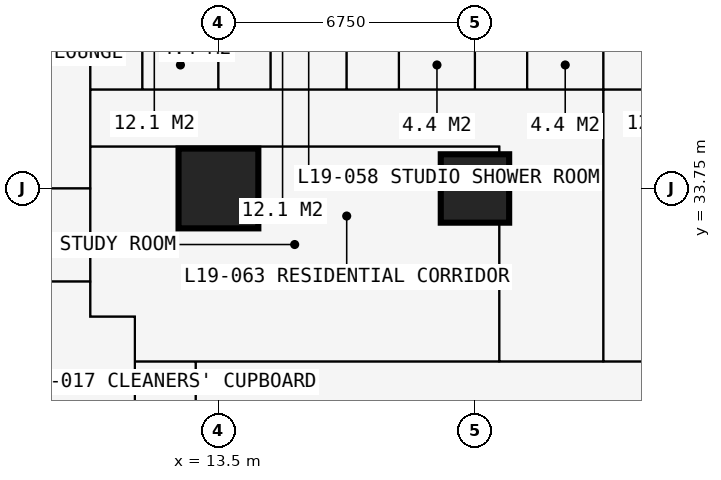
"""IFC4 building model, lengths in metres.
Left out: names, types, materials, properties, quantities, classifications, styles, units other than length and angle.
Written with IfcOpenShell. Run it as: python <this file> out.ifc"""

import sys

from ifc_helpers import new_model, si_unit, direction, frame, frame_2d, origin, origin_2d, place, context, subcontext, project, spatial, rectangle, extrude, element, fill, save


model = new_model("IFC4")
c1 = context("Model", 3, precision=1e-05, world=origin(), true_north=direction((0.0, 1.0)))
c2 = subcontext(c1, "Body", "Model", "MODEL_VIEW")
j1 = project(units=[si_unit("LENGTHUNIT", "METRE"), si_unit("PLANEANGLEUNIT", "RADIAN")], contexts=[c1])
p1 = place(None, origin())
s1 = spatial("IfcSite", under=j1, at=p1, CompositionType="ELEMENT")
p2 = place(p1, origin())
s2 = spatial("IfcBuilding", under=s1, at=p2, CompositionType="ELEMENT")
p3 = place(p2, frame((0.0, 0.0, 72.0)))
s3 = spatial("IfcBuildingStorey", under=s2, at=p3, CompositionType="ELEMENT", Elevation=72.0)
p4 = place(p3, frame((13.5, 33.75, 0.0), z_axis=(0.0, 0.0, 1.0), x_axis=(1.0, 0.0, 0.0)))
e1 = element("IfcColumn", 1, at=p4, inside=s3, PredefinedType="COLUMN", context=c2, shape_type="SweptSolid", body=[
    extrude(rectangle(XDim=2.1, YDim=2.1, at=origin_2d()), origin(), (0.0, 0.0, 1.0), 3.6),
])
p5 = place(p3, frame((20.25, 33.75, 0.0), z_axis=(0.0, 0.0, 1.0), x_axis=(1.0, 0.0, 0.0)))
e2 = element("IfcColumn", 2, at=p5, inside=s3, PredefinedType="COLUMN", context=c2, shape_type="SweptSolid", body=[
    extrude(rectangle(XDim=1.8, YDim=1.8, at=origin_2d()), origin(), (0.0, 0.0, 1.0), 3.6),
])
p6 = place(p3, frame((-0.734, 33.75, 0.0), z_axis=(0.0, 0.0, 1.0), x_axis=(1.0, 0.0, 0.0)))
e3 = element("IfcWall", 3, at=p6, inside=s3, PredefinedType="PARTITIONING", context=c2, shape_type="SweptSolid", body=[
    extrude(rectangle(XDim=10.859, YDim=0.15, at=frame_2d((5.429, 0.0))), origin(), (0.0, 0.0, 1.0), 2.802),
])
p7 = place(p3, frame((5.65, 31.3, 0.0), z_axis=(0.0, 0.0, 1.0), x_axis=(1.0, 0.0, 0.0)))
e4 = element("IfcWall", 4, at=p7, inside=s3, PredefinedType="PARTITIONING", context=c2, shape_type="SweptSolid", body=[
    extrude(rectangle(XDim=4.475, YDim=0.15, at=frame_2d((2.238, 0.0))), origin(), (0.0, 0.0, 1.0), 3.3),
])
p8 = place(p3, frame((10.125, 30.375, 0.0), z_axis=(0.0, 0.0, 1.0), x_axis=(0.0, 1.0, 0.0)))
e5 = element("IfcWall", 5, at=p8, inside=s3, PredefinedType="PARTITIONING", context=c2, shape_type="SweptSolid", body=[
    extrude(rectangle(XDim=10.859, YDim=0.15, at=frame_2d((5.429, 0.0))), origin(), (0.0, 0.0, 1.0), 3.3),
])
p9 = place(p8, frame((4.725, 0.0, 0.0)))
e6 = element("IfcOpeningElement", 6, at=p9, cuts=e5, PredefinedType="OPENING", context=c2, shape_type="SweptSolid", body=[
    extrude(rectangle(XDim=1.0, YDim=2.2, at=frame_2d((0.5, 1.1))), frame((0.0, 0.085, 0.0), z_axis=(0.0, -1.0, 0.0), x_axis=(1.0, 0.0, 0.0)), (0.0, 0.0, 1.0), 0.17),
])
p10 = place(p3, frame((10.125, 30.375, 0.0), z_axis=(0.0, 0.0, 1.0), x_axis=(1.0, 0.0, 0.0)))
e7 = element("IfcWall", 7, at=p10, inside=s3, PredefinedType="PARTITIONING", context=c2, shape_type="SweptSolid", body=[
    extrude(rectangle(XDim=1.175, YDim=0.15, at=frame_2d((0.587, 0.0))), origin(), (0.0, 0.0, 1.0), 3.3),
])
p11 = place(p3, frame((10.125, 34.85, 0.0), z_axis=(0.0, 0.0, 1.0), x_axis=(1.0, 0.0, 0.0)))
e8 = element("IfcWall", 8, at=p11, inside=s3, PredefinedType="PARTITIONING", context=c2, shape_type="SweptSolid", body=[
    extrude(rectangle(XDim=10.762, YDim=0.15, at=frame_2d((5.381, 0.0))), origin(), (0.0, 0.0, 1.0), 3.3),
])
p12 = place(p11, frame((4.9, 0.0, 0.0)))
e9 = element("IfcOpeningElement", 9, at=p12, cuts=e8, PredefinedType="OPENING", context=c2, shape_type="SweptSolid", body=[
    extrude(rectangle(XDim=0.95, YDim=2.2, at=frame_2d((0.475, 1.1))), frame((0.0, 0.085, 0.0), z_axis=(0.0, -1.0, 0.0), x_axis=(1.0, 0.0, 0.0)), (0.0, 0.0, 1.0), 0.17),
])
p13 = place(p3, frame((10.125, 36.35, 0.0), z_axis=(0.0, 0.0, 1.0), x_axis=(1.0, 0.0, 0.0)))
e10 = element("IfcWall", 10, at=p13, inside=s3, PredefinedType="PARTITIONING", context=c2, shape_type="SweptSolid", body=[
    extrude(rectangle(XDim=23.625, YDim=0.1, at=frame_2d((11.812, 0.0))), origin(), (0.0, 0.0, 1.0), 3.3),
])
p14 = place(p13, frame((21.45, 0.0, 0.0)))
e11 = element("IfcOpeningElement", 11, at=p14, cuts=e10, PredefinedType="OPENING", context=c2, shape_type="SweptSolid", body=[
    extrude(rectangle(XDim=1.0, YDim=2.2, at=frame_2d((0.5, 1.1))), frame((0.0, 0.06, 0.0), z_axis=(0.0, -1.0, 0.0), x_axis=(1.0, 0.0, 0.0)), (0.0, 0.0, 1.0), 0.12),
])
p15 = place(p13, frame((17.125, 0.0, 0.0)))
e12 = element("IfcOpeningElement", 12, at=p15, cuts=e10, PredefinedType="OPENING", context=c2, shape_type="SweptSolid", body=[
    extrude(rectangle(XDim=0.95, YDim=2.2, at=frame_2d((0.475, 1.1))), frame((0.0, 0.06, 0.0), z_axis=(0.0, -1.0, 0.0), x_axis=(1.0, 0.0, 0.0)), (0.0, 0.0, 1.0), 0.12),
])
p16 = place(p13, frame((13.7, 0.0, 0.0)))
e13 = element("IfcOpeningElement", 13, at=p16, cuts=e10, PredefinedType="OPENING", context=c2, shape_type="SweptSolid", body=[
    extrude(rectangle(XDim=0.95, YDim=2.2, at=frame_2d((0.475, 1.1))), frame((0.0, 0.06, 0.0), z_axis=(0.0, -1.0, 0.0), x_axis=(1.0, 0.0, 0.0)), (0.0, 0.0, 1.0), 0.12),
])
p17 = place(p13, frame((0.2, 0.0, 0.0)))
e14 = element("IfcOpeningElement", 14, at=p17, cuts=e10, PredefinedType="OPENING", context=c2, shape_type="SweptSolid", body=[
    extrude(rectangle(XDim=0.95, YDim=2.2, at=frame_2d((0.475, 1.1))), frame((0.0, 0.06, 0.0), z_axis=(0.0, -1.0, 0.0), x_axis=(1.0, 0.0, 0.0)), (0.0, 0.0, 1.0), 0.12),
])
p18 = place(p13, frame((3.625, 0.0, 0.0)))
e15 = element("IfcOpeningElement", 15, at=p18, cuts=e10, PredefinedType="OPENING", context=c2, shape_type="SweptSolid", body=[
    extrude(rectangle(XDim=0.95, YDim=2.2, at=frame_2d((0.475, 1.1))), frame((0.0, 0.06, 0.0), z_axis=(0.0, -1.0, 0.0), x_axis=(1.0, 0.0, 0.0)), (0.0, 0.0, 1.0), 0.12),
])
p19 = place(p13, frame((7.0, 0.0, 0.0)))
e16 = element("IfcOpeningElement", 16, at=p19, cuts=e10, PredefinedType="OPENING", context=c2, shape_type="SweptSolid", body=[
    extrude(rectangle(XDim=0.95, YDim=2.2, at=frame_2d((0.475, 1.1))), frame((0.0, 0.06, 0.0), z_axis=(0.0, -1.0, 0.0), x_axis=(1.0, 0.0, 0.0)), (0.0, 0.0, 1.0), 0.12),
])
p20 = place(p13, frame((10.375, 0.0, 0.0)))
e17 = element("IfcOpeningElement", 17, at=p20, cuts=e10, PredefinedType="OPENING", context=c2, shape_type="SweptSolid", body=[
    extrude(rectangle(XDim=0.95, YDim=2.2, at=frame_2d((0.475, 1.1))), frame((0.0, 0.06, 0.0), z_axis=(0.0, -1.0, 0.0), x_axis=(1.0, 0.0, 0.0)), (0.0, 0.0, 1.0), 0.12),
])
p21 = place(p3, frame((11.3, 11.3, 0.0), z_axis=(0.0, 0.0, 1.0), x_axis=(0.0, 1.0, 0.0)))
e18 = element("IfcWall", 18, at=p21, inside=s3, PredefinedType="PARTITIONING", context=c2, shape_type="SweptSolid", body=[
    extrude(rectangle(XDim=19.075, YDim=0.15, at=frame_2d((9.538, 0.0))), origin(), (0.0, 0.0, 1.0), 3.3),
])
p22 = place(p21, frame((10.137, 0.0, 0.0)))
e19 = element("IfcOpeningElement", 19, at=p22, cuts=e18, PredefinedType="OPENING", context=c2, shape_type="SweptSolid", body=[
    extrude(rectangle(XDim=1.0, YDim=2.2, at=frame_2d((0.5, 1.1))), frame((0.0, 0.085, 0.0), z_axis=(0.0, -1.0, 0.0), x_axis=(1.0, 0.0, 0.0)), (0.0, 0.0, 1.0), 0.17),
])
p23 = place(p3, frame((11.3, 29.2, 0.0), z_axis=(0.0, 0.0, 1.0), x_axis=(1.0, 0.0, 0.0)))
e20 = element("IfcWall", 20, at=p23, inside=s3, PredefinedType="PARTITIONING", context=c2, shape_type="SweptSolid", body=[
    extrude(rectangle(XDim=19.075, YDim=0.15, at=frame_2d((9.538, 0.0))), origin(), (0.0, 0.0, 1.0), 3.3),
])
p24 = place(p23, frame((12.875, 0.0, 0.0)))
e21 = element("IfcOpeningElement", 21, at=p24, cuts=e20, PredefinedType="OPENING", context=c2, shape_type="SweptSolid", body=[
    extrude(rectangle(XDim=1.0, YDim=2.2, at=frame_2d((0.5, 1.1))), frame((0.0, 0.085, 0.0), z_axis=(0.0, -1.0, 0.0), x_axis=(1.0, 0.0, 0.0)), (0.0, 0.0, 1.0), 0.17),
])
p25 = place(p23, frame((10.438, 0.0, 0.0)))
e22 = element("IfcOpeningElement", 22, at=p25, cuts=e20, PredefinedType="OPENING", context=c2, shape_type="SweptSolid", body=[
    extrude(rectangle(XDim=1.0, YDim=2.2, at=frame_2d((0.5, 1.1))), frame((0.0, 0.085, 0.0), z_axis=(0.0, -1.0, 0.0), x_axis=(1.0, 0.0, 0.0)), (0.0, 0.0, 1.0), 0.17),
])
p26 = place(p23, frame((15.675, 0.0, 0.0)))
e23 = element("IfcOpeningElement", 23, at=p26, cuts=e20, PredefinedType="OPENING", context=c2, shape_type="SweptSolid", body=[
    extrude(rectangle(XDim=0.95, YDim=2.2, at=frame_2d((0.475, 1.1))), frame((0.0, 0.085, 0.0), z_axis=(0.0, -1.0, 0.0), x_axis=(1.0, 0.0, 0.0)), (0.0, 0.0, 1.0), 0.17),
])
p27 = place(p3, frame((11.5, 36.35, 0.0), z_axis=(0.0, 0.0, 1.0), x_axis=(0.0, 1.0, 0.0)))
e24 = element("IfcWall", 24, at=p27, inside=s3, PredefinedType="PARTITIONING", context=c2, shape_type="SweptSolid", body=[
    extrude(rectangle(XDim=2.2, YDim=0.1, at=frame_2d((1.1, 0.0))), origin(), (0.0, 0.0, 1.0), 3.3),
])
p28 = place(p27, frame((0.65, 0.0, 0.0)))
e25 = element("IfcOpeningElement", 25, at=p28, cuts=e24, PredefinedType="OPENING", context=c2, shape_type="SweptSolid", body=[
    extrude(rectangle(XDim=0.9, YDim=2.2, at=frame_2d((0.45, 1.1))), frame((0.0, 0.06, 0.0), z_axis=(0.0, -1.0, 0.0), x_axis=(1.0, 0.0, 0.0)), (0.0, 0.0, 1.0), 0.12),
])
p29 = place(p3, frame((12.9, 27.6, 0.0), z_axis=(0.0, 0.0, 1.0), x_axis=(0.0, 1.0, 0.0)))
e26 = element("IfcWall", 26, at=p29, inside=s3, PredefinedType="PARTITIONING", context=c2, shape_type="SweptSolid", body=[
    extrude(rectangle(XDim=1.6, YDim=0.15, at=frame_2d((0.8, 0.0))), origin(), (0.0, 0.0, 1.0), 3.3),
])
p30 = place(p3, frame((13.5, 36.35, 0.0), z_axis=(0.0, 0.0, 1.0), x_axis=(0.0, 1.0, 0.0)))
e27 = element("IfcWall", 27, at=p30, inside=s3, PredefinedType="PARTITIONING", context=c2, shape_type="SweptSolid", body=[
    extrude(rectangle(XDim=4.884, YDim=0.175, at=frame_2d((2.442, 0.0))), origin(), (0.0, 0.0, 1.0), 2.802),
])
p31 = place(p3, frame((14.875, 36.35, 0.0), z_axis=(0.0, 0.0, 1.0), x_axis=(0.0, 1.0, 0.0)))
e28 = element("IfcWall", 28, at=p31, inside=s3, PredefinedType="PARTITIONING", context=c2, shape_type="SweptSolid", body=[
    extrude(rectangle(XDim=2.2, YDim=0.1, at=frame_2d((1.1, 0.0))), origin(), (0.0, 0.0, 1.0), 3.3),
])
p32 = place(p31, frame((0.65, 0.0, 0.0)))
e29 = element("IfcOpeningElement", 29, at=p32, cuts=e28, PredefinedType="OPENING", context=c2, shape_type="SweptSolid", body=[
    extrude(rectangle(XDim=0.9, YDim=2.2, at=frame_2d((0.45, 1.1))), frame((0.0, 0.06, 0.0), z_axis=(0.0, -1.0, 0.0), x_axis=(1.0, 0.0, 0.0)), (0.0, 0.0, 1.0), 0.12),
])
p33 = place(p3, frame((16.875, 36.35, 0.0), z_axis=(0.0, 0.0, 1.0), x_axis=(0.0, 1.0, 0.0)))
e30 = element("IfcWall", 30, at=p33, inside=s3, PredefinedType="PARTITIONING", context=c2, shape_type="SweptSolid", body=[
    extrude(rectangle(XDim=4.884, YDim=0.175, at=frame_2d((2.442, 0.0))), origin(), (0.0, 0.0, 1.0), 3.3),
])
p34 = place(p3, frame((18.25, 36.35, 0.0), z_axis=(0.0, 0.0, 1.0), x_axis=(0.0, 1.0, 0.0)))
e31 = element("IfcWall", 31, at=p34, inside=s3, PredefinedType="PARTITIONING", context=c2, shape_type="SweptSolid", body=[
    extrude(rectangle(XDim=2.2, YDim=0.1, at=frame_2d((1.1, 0.0))), origin(), (0.0, 0.0, 1.0), 3.3),
])
p35 = place(p34, frame((0.65, 0.0, 0.0)))
e32 = element("IfcOpeningElement", 32, at=p35, cuts=e31, PredefinedType="OPENING", context=c2, shape_type="SweptSolid", body=[
    extrude(rectangle(XDim=0.9, YDim=2.2, at=frame_2d((0.45, 1.1))), frame((0.0, 0.06, 0.0), z_axis=(0.0, -1.0, 0.0), x_axis=(1.0, 0.0, 0.0)), (0.0, 0.0, 1.0), 0.12),
])
p36 = place(p3, frame((20.25, 36.35, 0.0), z_axis=(0.0, 0.0, 1.0), x_axis=(0.0, 1.0, 0.0)))
e33 = element("IfcWall", 33, at=p36, inside=s3, PredefinedType="PARTITIONING", context=c2, shape_type="SweptSolid", body=[
    extrude(rectangle(XDim=4.884, YDim=0.175, at=frame_2d((2.442, 0.0))), origin(), (0.0, 0.0, 1.0), 2.731),
])
p37 = place(p3, frame((20.887, 29.2, 0.0), z_axis=(0.0, 0.0, 1.0), x_axis=(0.0, 1.0, 0.0)))
e34 = element("IfcWall", 34, at=p37, inside=s3, PredefinedType="PARTITIONING", context=c2, shape_type="SweptSolid", body=[
    extrude(rectangle(XDim=5.65, YDim=0.15, at=frame_2d((2.825, 0.0))), origin(), (0.0, 0.0, 1.0), 3.3),
])
p38 = place(p3, frame((21.625, 36.35, 0.0), z_axis=(0.0, 0.0, 1.0), x_axis=(0.0, 1.0, 0.0)))
e35 = element("IfcWall", 35, at=p38, inside=s3, PredefinedType="PARTITIONING", context=c2, shape_type="SweptSolid", body=[
    extrude(rectangle(XDim=2.2, YDim=0.1, at=frame_2d((1.1, 0.0))), origin(), (0.0, 0.0, 1.0), 3.3),
])
p39 = place(p38, frame((0.65, 0.0, 0.0)))
e36 = element("IfcOpeningElement", 36, at=p39, cuts=e35, PredefinedType="OPENING", context=c2, shape_type="SweptSolid", body=[
    extrude(rectangle(XDim=0.9, YDim=2.2, at=frame_2d((0.45, 1.1))), frame((0.0, 0.06, 0.0), z_axis=(0.0, -1.0, 0.0), x_axis=(1.0, 0.0, 0.0)), (0.0, 0.0, 1.0), 0.12),
])
p40 = place(p3, frame((23.625, 29.2, 0.0), z_axis=(0.0, 0.0, 1.0), x_axis=(0.0, 1.0, 0.0)))
e37 = element("IfcWall", 37, at=p40, inside=s3, PredefinedType="PARTITIONING", context=c2, shape_type="SweptSolid", body=[
    extrude(rectangle(XDim=12.034, YDim=0.15, at=frame_2d((6.017, 0.0))), origin(), (0.0, 0.0, 1.0), 3.3),
])
p41 = place(p16, origin())
e38 = element("IfcDoor", 38, at=p41, inside=s3, OperationType="SINGLE_SWING_LEFT", PredefinedType="DOOR", context=c2, shape_type="SweptSolid", body=[
    extrude(rectangle(XDim=0.95, YDim=2.2, at=frame_2d((0.475, 1.1))), frame((0.0, 0.025, 0.0), z_axis=(0.0, -1.0, 0.0), x_axis=(1.0, 0.0, 0.0)), (0.0, 0.0, 1.0), 0.05),
])
fill(e13, e38)
p42 = place(p24, origin())
e39 = element("IfcDoor", 39, at=p42, inside=s3, OperationType="SINGLE_SWING_LEFT", PredefinedType="DOOR", context=c2, shape_type="SweptSolid", body=[
    extrude(rectangle(XDim=1.0, YDim=2.2, at=frame_2d((0.5, 1.1))), frame((0.0, 0.025, 0.0), z_axis=(0.0, -1.0, 0.0), x_axis=(1.0, 0.0, 0.0)), (0.0, 0.0, 1.0), 0.05),
])
fill(e21, e39)
p43 = place(p17, origin())
e40 = element("IfcDoor", 40, at=p43, inside=s3, OperationType="SINGLE_SWING_LEFT", PredefinedType="DOOR", context=c2, shape_type="SweptSolid", body=[
    extrude(rectangle(XDim=0.95, YDim=2.2, at=frame_2d((0.475, 1.1))), frame((0.0, 0.025, 0.0), z_axis=(0.0, -1.0, 0.0), x_axis=(1.0, 0.0, 0.0)), (0.0, 0.0, 1.0), 0.05),
])
fill(e14, e40)
p44 = place(p28, origin())
e41 = element("IfcDoor", 41, at=p44, inside=s3, OperationType="SINGLE_SWING_RIGHT", PredefinedType="DOOR", context=c2, shape_type="SweptSolid", body=[
    extrude(rectangle(XDim=0.9, YDim=2.2, at=frame_2d((0.45, 1.1))), frame((0.0, 0.025, 0.0), z_axis=(0.0, -1.0, 0.0), x_axis=(1.0, 0.0, 0.0)), (0.0, 0.0, 1.0), 0.05),
])
fill(e25, e41)
p45 = place(p18, origin())
e42 = element("IfcDoor", 42, at=p45, inside=s3, OperationType="SINGLE_SWING_LEFT", PredefinedType="DOOR", context=c2, shape_type="SweptSolid", body=[
    extrude(rectangle(XDim=0.95, YDim=2.2, at=frame_2d((0.475, 1.1))), frame((0.0, 0.025, 0.0), z_axis=(0.0, -1.0, 0.0), x_axis=(1.0, 0.0, 0.0)), (0.0, 0.0, 1.0), 0.05),
])
fill(e15, e42)
p46 = place(p32, origin())
e43 = element("IfcDoor", 43, at=p46, inside=s3, OperationType="SINGLE_SWING_RIGHT", PredefinedType="DOOR", context=c2, shape_type="SweptSolid", body=[
    extrude(rectangle(XDim=0.9, YDim=2.2, at=frame_2d((0.45, 1.1))), frame((0.0, 0.025, 0.0), z_axis=(0.0, -1.0, 0.0), x_axis=(1.0, 0.0, 0.0)), (0.0, 0.0, 1.0), 0.05),
])
fill(e29, e43)
p47 = place(p19, origin())
e44 = element("IfcDoor", 44, at=p47, inside=s3, OperationType="SINGLE_SWING_LEFT", PredefinedType="DOOR", context=c2, shape_type="SweptSolid", body=[
    extrude(rectangle(XDim=0.95, YDim=2.2, at=frame_2d((0.475, 1.1))), frame((0.0, 0.025, 0.0), z_axis=(0.0, -1.0, 0.0), x_axis=(1.0, 0.0, 0.0)), (0.0, 0.0, 1.0), 0.05),
])
fill(e16, e44)
p48 = place(p35, origin())
e45 = element("IfcDoor", 45, at=p48, inside=s3, OperationType="SINGLE_SWING_RIGHT", PredefinedType="DOOR", context=c2, shape_type="SweptSolid", body=[
    extrude(rectangle(XDim=0.9, YDim=2.2, at=frame_2d((0.45, 1.1))), frame((0.0, 0.025, 0.0), z_axis=(0.0, -1.0, 0.0), x_axis=(1.0, 0.0, 0.0)), (0.0, 0.0, 1.0), 0.05),
])
fill(e32, e45)
p49 = place(p20, origin())
e46 = element("IfcDoor", 46, at=p49, inside=s3, OperationType="SINGLE_SWING_LEFT", PredefinedType="DOOR", context=c2, shape_type="SweptSolid", body=[
    extrude(rectangle(XDim=0.95, YDim=2.2, at=frame_2d((0.475, 1.1))), frame((0.0, 0.025, 0.0), z_axis=(0.0, -1.0, 0.0), x_axis=(1.0, 0.0, 0.0)), (0.0, 0.0, 1.0), 0.05),
])
fill(e17, e46)
p50 = place(p39, origin())
e47 = element("IfcDoor", 47, at=p50, inside=s3, OperationType="SINGLE_SWING_RIGHT", PredefinedType="DOOR", context=c2, shape_type="SweptSolid", body=[
    extrude(rectangle(XDim=0.9, YDim=2.2, at=frame_2d((0.45, 1.1))), frame((0.0, 0.025, 0.0), z_axis=(0.0, -1.0, 0.0), x_axis=(1.0, 0.0, 0.0)), (0.0, 0.0, 1.0), 0.05),
])
fill(e36, e47)
p51 = place(p25, origin())
e48 = element("IfcDoor", 48, at=p51, inside=s3, OperationType="SINGLE_SWING_LEFT", PredefinedType="DOOR", context=c2, shape_type="SweptSolid", body=[
    extrude(rectangle(XDim=1.0, YDim=2.2, at=frame_2d((0.5, 1.1))), frame((0.0, 0.025, 0.0), z_axis=(0.0, -1.0, 0.0), x_axis=(1.0, 0.0, 0.0)), (0.0, 0.0, 1.0), 0.05),
])
fill(e22, e48)
p52 = place(p12, origin())
e49 = element("IfcDoor", 49, at=p52, inside=s3, OperationType="SINGLE_SWING_LEFT", PredefinedType="DOOR", context=c2, shape_type="SweptSolid", body=[
    extrude(rectangle(XDim=0.95, YDim=2.2, at=frame_2d((0.475, 1.1))), frame((0.0, 0.025, 0.0), z_axis=(0.0, -1.0, 0.0), x_axis=(1.0, 0.0, 0.0)), (0.0, 0.0, 1.0), 0.05),
])
fill(e9, e49)
p53 = place(p9, origin())
e50 = element("IfcDoor", 50, at=p53, inside=s3, OperationType="SINGLE_SWING_LEFT", PredefinedType="DOOR", context=c2, shape_type="SweptSolid", body=[
    extrude(rectangle(XDim=1.0, YDim=2.2, at=frame_2d((0.5, 1.1))), frame((0.0, 0.025, 0.0), z_axis=(0.0, -1.0, 0.0), x_axis=(1.0, 0.0, 0.0)), (0.0, 0.0, 1.0), 0.05),
])
fill(e6, e50)
save(model, sys.argv[1])
